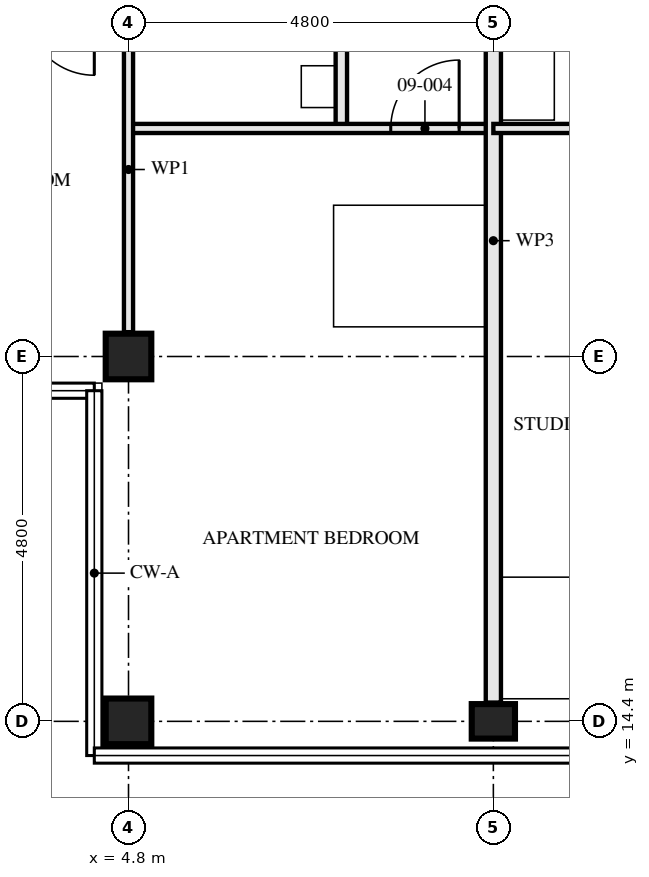
"""IFC4 building model, lengths in metres.
Left out: names, types, materials, properties, quantities, classifications, styles, units other than length and angle.
Written with IfcOpenShell. Run it as: python <this file> out.ifc"""

import sys

from ifc_helpers import new_model, si_unit, direction, frame, frame_2d, origin, origin_2d, place, context, subcontext, project, spatial, rectangle, hollow_rectangle, i_section, extrude, element, fill, save


model = new_model("IFC4")
c1 = context("Model", 3, precision=1e-05, world=origin(), true_north=direction((0.0, 1.0)))
c2 = subcontext(c1, "Body", "Model", "MODEL_VIEW")
j1 = project(units=[si_unit("LENGTHUNIT", "METRE"), si_unit("PLANEANGLEUNIT", "RADIAN")], contexts=[c1])
p1 = place(None, origin())
s1 = spatial("IfcSite", under=j1, at=p1, CompositionType="ELEMENT")
p2 = place(p1, origin())
s2 = spatial("IfcBuilding", under=s1, at=p2, CompositionType="ELEMENT")
p3 = place(p2, frame((0.0, 0.0, 37.5)))
s3 = spatial("IfcBuildingStorey", under=s2, at=p3, CompositionType="ELEMENT", Elevation=37.5)
for number, where, z_axis, x_axis in (
    (1, (4.8, 14.4, 0.0), (0.0, 0.0, 1.0), (0.0, 1.0, 0.0)),
    (2, (4.8, 19.2, 0.0), (0.0, 0.0, 1.0), (0.0, 1.0, 0.0)),
):
    element("IfcColumn", number, at=place(p3, frame(where, z_axis=z_axis, x_axis=x_axis)), inside=s3, PredefinedType="COLUMN", context=c2, shape_type="SweptSolid", body=[
        extrude(hollow_rectangle(XDim=0.6, YDim=0.6, WallThickness=0.05, at=origin_2d()), origin(), (0.0, 0.0, 1.0), 3.5),
    ])
p4 = place(p3, frame((9.6, 14.4, 0.0), z_axis=(0.0, 0.0, 1.0), x_axis=(0.0, 1.0, 0.0)))
e3 = element("IfcColumn", 3, at=p4, inside=s3, PredefinedType="COLUMN", context=c2, shape_type="SweptSolid", body=[
    extrude(i_section(OverallWidth=0.454, OverallDepth=0.569, WebThickness=0.078, FlangeThickness=0.125, FilletRadius=0.015, at=origin_2d()), origin(), (0.0, 0.0, 1.0), 3.5),
])
p5 = place(p3, frame((7.6, 22.2, 0.0), z_axis=(0.0, 0.0, 1.0), x_axis=(0.0, 1.0, 0.0)))
e4 = element("IfcWall", 4, at=p5, inside=s3, PredefinedType="PARTITIONING", context=c2, shape_type="SweptSolid", body=[
    extrude(rectangle(XDim=3.0, YDim=0.15, at=frame_2d((1.5, 0.0))), origin(), (0.0, 0.0, 1.0), 2.55),
])
p6 = place(p5, frame((1.05, 0.0, 0.0)))
e5 = element("IfcOpeningElement", 5, at=p6, cuts=e4, PredefinedType="OPENING", context=c2, shape_type="SweptSolid", body=[
    extrude(rectangle(XDim=0.9, YDim=2.1, at=frame_2d((0.45, 1.05))), frame((0.0, 0.085, 0.0), z_axis=(0.0, -1.0, 0.0), x_axis=(1.0, 0.0, 0.0)), (0.0, 0.0, 1.0), 0.171),
])
p7 = place(p3, frame((4.8, 22.2, 0.0), z_axis=(0.0, 0.0, 1.0), x_axis=(1.0, 0.0, 0.0)))
e6 = element("IfcWall", 6, at=p7, inside=s3, PredefinedType="PARTITIONING", context=c2, shape_type="SweptSolid", body=[
    extrude(rectangle(XDim=4.8, YDim=0.12, at=frame_2d((2.4, 0.0))), origin(), (0.0, 0.0, 1.0), 3.33),
])
p8 = place(p7, frame((3.45, 0.0, 0.0)))
e7 = element("IfcOpeningElement", 7, at=p8, cuts=e6, PredefinedType="OPENING", context=c2, shape_type="SweptSolid", body=[
    extrude(rectangle(XDim=0.9, YDim=2.1, at=frame_2d((0.45, 1.05))), frame((0.0, 0.071, 0.0), z_axis=(0.0, -1.0, 0.0), x_axis=(1.0, 0.0, 0.0)), (0.0, 0.0, 1.0), 0.141),
])
p9 = place(p3, frame((4.8, 19.52, 0.0), z_axis=(0.0, 0.0, 1.0), x_axis=(0.0, 1.0, 0.0)))
e8 = element("IfcWall", 8, at=p9, inside=s3, PredefinedType="PARTITIONING", context=c2, shape_type="SweptSolid", body=[
    extrude(rectangle(XDim=4.28, YDim=0.12, at=frame_2d((2.14, 0.0))), origin(), (0.0, 0.0, 1.0), 3.33),
])
p10 = place(p3, frame((9.6, 14.647, 0.0), z_axis=(0.0, 0.0, 1.0), x_axis=(0.0, 1.0, 0.0)))
e9 = element("IfcWall", 9, at=p10, inside=s3, PredefinedType="PARTITIONING", context=c2, shape_type="SweptSolid", body=[
    extrude(rectangle(XDim=12.153, YDim=0.2, at=frame_2d((6.077, 0.0))), origin(), (0.0, 0.0, 1.0), 2.55),
])
p11 = place(p3, frame((9.6, 22.2, 0.0), z_axis=(0.0, 0.0, 1.0), x_axis=(1.0, 0.0, 0.0)))
e10 = element("IfcWall", 10, at=p11, inside=s3, PredefinedType="PARTITIONING", context=c2, shape_type="SweptSolid", body=[
    extrude(rectangle(XDim=4.8, YDim=0.12, at=frame_2d((2.4, 0.0))), origin(), (0.0, 0.0, 1.0), 3.33),
])
p12 = place(p11, frame((3.45, 0.0, 0.0)))
e11 = element("IfcOpeningElement", 11, at=p12, cuts=e10, PredefinedType="OPENING", context=c2, shape_type="SweptSolid", body=[
    extrude(rectangle(XDim=0.9, YDim=2.1, at=frame_2d((0.45, 1.05))), frame((0.0, 0.071, 0.0), z_axis=(0.0, -1.0, 0.0), x_axis=(1.0, 0.0, 0.0)), (0.0, 0.0, 1.0), 0.141),
])
p13 = place(p8, origin())
e12 = element("IfcDoor", 12, at=p13, inside=s3, OperationType="SINGLE_SWING_LEFT", PredefinedType="DOOR", context=c2, shape_type="SweptSolid", body=[
    extrude(rectangle(XDim=0.9, YDim=2.1, at=frame_2d((0.45, 1.05))), frame((0.0, 0.022, 0.0), z_axis=(0.0, -1.0, 0.0), x_axis=(1.0, 0.0, 0.0)), (0.0, 0.0, 1.0), 0.044),
])
fill(e7, e12)
save(model, sys.argv[1])
